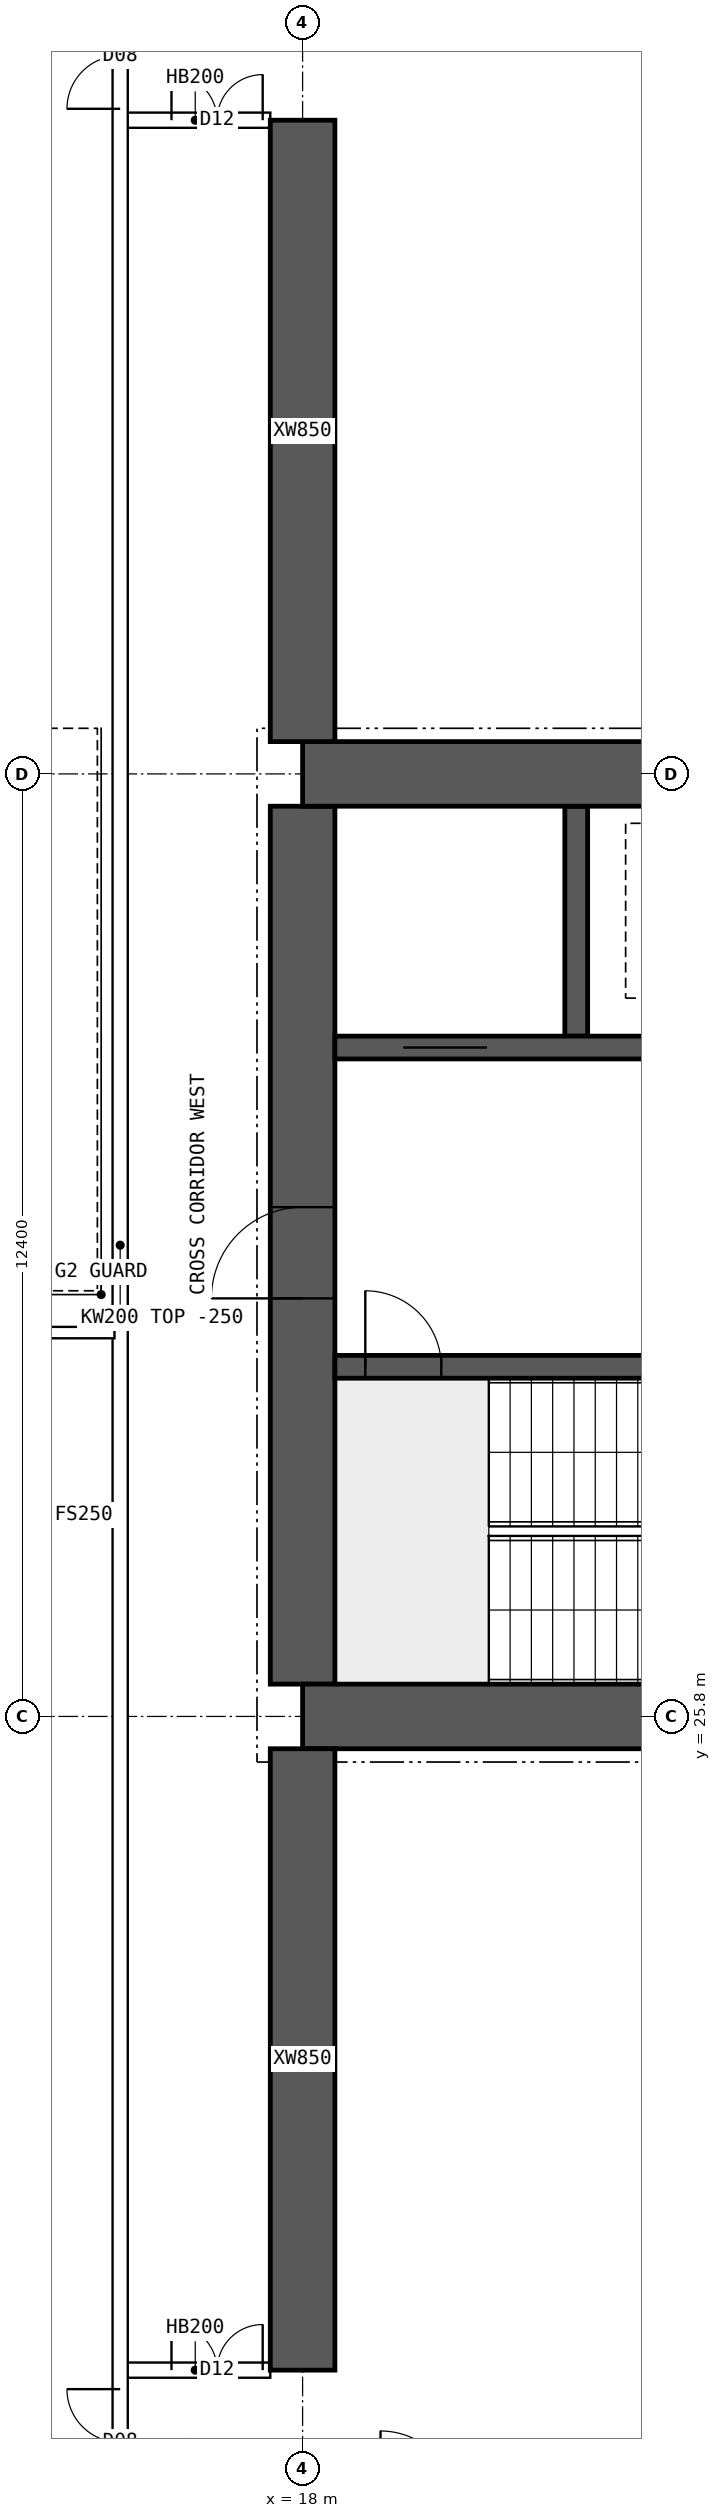
"""IFC4 building model, lengths in metres.
Left out: names, types, materials, properties, quantities, classifications, styles, units other than length and angle.
Written with IfcOpenShell. Run it as: python <this file> out.ifc"""

import sys

from ifc_helpers import new_model, si_unit, direction, frame, frame_2d, origin, place, context, subcontext, project, spatial, polyline, rectangle, outline, extrude, element, fill, save


model = new_model("IFC4")
c1 = context("Model", 3, precision=1e-05, world=origin(), true_north=direction((0.0, 1.0)))
c2 = subcontext(c1, "Body", "Model", "MODEL_VIEW")
j1 = project(units=[si_unit("LENGTHUNIT", "METRE"), si_unit("PLANEANGLEUNIT", "RADIAN")], contexts=[c1])
p1 = place(None, origin())
s1 = spatial("IfcSite", under=j1, at=p1, CompositionType="ELEMENT")
p2 = place(p1, origin())
s2 = spatial("IfcBuilding", under=s1, at=p2, CompositionType="ELEMENT")
p3 = place(p2, frame((0.0, 0.0, 182.35)))
s3 = spatial("IfcBuildingStorey", under=s2, at=p3, CompositionType="ELEMENT", Elevation=182.35)
for number, where, z_axis, x_axis in (
    (1, (18.0, 25.8, 0.0), (0.0, 0.0, 1.0), (1.0, 0.0, 0.0)),
    (2, (18.0, 38.2, 0.0), (0.0, 0.0, 1.0), (1.0, 0.0, 0.0)),
):
    element("IfcWall", number, at=place(p3, frame(where, z_axis=z_axis, x_axis=x_axis)), inside=s3, PredefinedType="SHEAR", context=c2, shape_type="SweptSolid", body=[
        extrude(rectangle(XDim=48.0, YDim=0.85, at=frame_2d((24.0, 0.0))), origin(), (0.0, 0.0, 1.0), 3.75),
    ])
p4 = place(p3, frame((18.0, 26.225, 0.0), z_axis=(0.0, 0.0, 1.0), x_axis=(0.0, 1.0, 0.0)))
e3 = element("IfcWall", 3, at=p4, inside=s3, PredefinedType="SHEAR", context=c2, shape_type="SweptSolid", body=[
    extrude(rectangle(XDim=11.55, YDim=0.85, at=frame_2d((5.775, 0.0))), origin(), (0.0, 0.0, 1.0), 3.75),
])
p5 = place(p4, frame((5.075, 0.0, 0.0)))
e4 = element("IfcOpeningElement", 4, at=p5, cuts=e3, PredefinedType="OPENING", context=c2, shape_type="SweptSolid", body=[
    extrude(rectangle(XDim=1.2, YDim=2.1, at=frame_2d((0.6, 1.05))), frame((0.0, 0.435, 0.0), z_axis=(0.0, -1.0, 0.0), x_axis=(1.0, 0.0, 0.0)), (0.0, 0.0, 1.0), 0.87),
])
p6 = place(p3, frame((18.425, 30.4, 0.0), z_axis=(0.0, 0.0, 1.0), x_axis=(1.0, 0.0, 0.0)))
e5 = element("IfcWall", 5, at=p6, inside=s3, PredefinedType="SHEAR", context=c2, shape_type="SweptSolid", body=[
    extrude(rectangle(XDim=47.15, YDim=0.3, at=frame_2d((23.575, 0.0))), origin(), (0.0, 0.0, 1.0), 3.75),
])
p7 = place(p6, frame((0.4, 0.0, 0.0)))
e6 = element("IfcOpeningElement", 6, at=p7, cuts=e5, PredefinedType="OPENING", context=c2, shape_type="SweptSolid", body=[
    extrude(rectangle(XDim=1.0, YDim=2.1, at=frame_2d((0.5, 1.05))), frame((0.0, 0.16, 0.0), z_axis=(0.0, -1.0, 0.0), x_axis=(1.0, 0.0, 0.0)), (0.0, 0.0, 1.0), 0.32),
])
p8 = place(p6, frame((45.75, 0.0, 0.0)))
e7 = element("IfcOpeningElement", 7, at=p8, cuts=e5, PredefinedType="OPENING", context=c2, shape_type="SweptSolid", body=[
    extrude(rectangle(XDim=1.0, YDim=2.1, at=frame_2d((0.5, 1.05))), frame((0.0, 0.16, 0.0), z_axis=(0.0, -1.0, 0.0), x_axis=(1.0, 0.0, 0.0)), (0.0, 0.0, 1.0), 0.32),
])
p9 = place(p6, frame((8.325, 0.0, 0.0)))
e8 = element("IfcOpeningElement", 8, at=p9, cuts=e5, PredefinedType="OPENING", context=c2, shape_type="SweptSolid", body=[
    extrude(rectangle(XDim=1.1, YDim=2.1, at=frame_2d((0.55, 1.05))), frame((0.0, 0.16, 0.0), z_axis=(0.0, -1.0, 0.0), x_axis=(1.0, 0.0, 0.0)), (0.0, 0.0, 1.0), 0.32),
])
p10 = place(p6, frame((10.925, 0.0, 0.0)))
e9 = element("IfcOpeningElement", 9, at=p10, cuts=e5, PredefinedType="OPENING", context=c2, shape_type="SweptSolid", body=[
    extrude(rectangle(XDim=1.1, YDim=2.1, at=frame_2d((0.55, 1.05))), frame((0.0, 0.16, 0.0), z_axis=(0.0, -1.0, 0.0), x_axis=(1.0, 0.0, 0.0)), (0.0, 0.0, 1.0), 0.32),
])
p11 = place(p6, frame((13.525, 0.0, 0.0)))
e10 = element("IfcOpeningElement", 10, at=p11, cuts=e5, PredefinedType="OPENING", context=c2, shape_type="SweptSolid", body=[
    extrude(rectangle(XDim=1.1, YDim=2.1, at=frame_2d((0.55, 1.05))), frame((0.0, 0.16, 0.0), z_axis=(0.0, -1.0, 0.0), x_axis=(1.0, 0.0, 0.0)), (0.0, 0.0, 1.0), 0.32),
])
p12 = place(p6, frame((16.125, 0.0, 0.0)))
e11 = element("IfcOpeningElement", 11, at=p12, cuts=e5, PredefinedType="OPENING", context=c2, shape_type="SweptSolid", body=[
    extrude(rectangle(XDim=1.1, YDim=2.1, at=frame_2d((0.55, 1.05))), frame((0.0, 0.16, 0.0), z_axis=(0.0, -1.0, 0.0), x_axis=(1.0, 0.0, 0.0)), (0.0, 0.0, 1.0), 0.32),
])
p13 = place(p6, frame((18.9, 0.0, 0.0)))
e12 = element("IfcOpeningElement", 12, at=p13, cuts=e5, PredefinedType="OPENING", context=c2, shape_type="SweptSolid", body=[
    extrude(rectangle(XDim=0.9, YDim=2.1, at=frame_2d((0.45, 1.05))), frame((0.0, 0.16, 0.0), z_axis=(0.0, -1.0, 0.0), x_axis=(1.0, 0.0, 0.0)), (0.0, 0.0, 1.0), 0.32),
])
p14 = place(p6, frame((30.192, 0.0, 0.0)))
e13 = element("IfcOpeningElement", 13, at=p14, cuts=e5, PredefinedType="OPENING", context=c2, shape_type="SweptSolid", body=[
    extrude(rectangle(XDim=1.1, YDim=2.1, at=frame_2d((0.55, 1.05))), frame((0.0, 0.16, 0.0), z_axis=(0.0, -1.0, 0.0), x_axis=(1.0, 0.0, 0.0)), (0.0, 0.0, 1.0), 0.32),
])
p15 = place(p6, frame((33.725, 0.0, 0.0)))
e14 = element("IfcOpeningElement", 14, at=p15, cuts=e5, PredefinedType="OPENING", context=c2, shape_type="SweptSolid", body=[
    extrude(rectangle(XDim=1.1, YDim=2.1, at=frame_2d((0.55, 1.05))), frame((0.0, 0.16, 0.0), z_axis=(0.0, -1.0, 0.0), x_axis=(1.0, 0.0, 0.0)), (0.0, 0.0, 1.0), 0.32),
])
p16 = place(p6, frame((37.258, 0.0, 0.0)))
e15 = element("IfcOpeningElement", 15, at=p16, cuts=e5, PredefinedType="OPENING", context=c2, shape_type="SweptSolid", body=[
    extrude(rectangle(XDim=1.1, YDim=2.1, at=frame_2d((0.55, 1.05))), frame((0.0, 0.16, 0.0), z_axis=(0.0, -1.0, 0.0), x_axis=(1.0, 0.0, 0.0)), (0.0, 0.0, 1.0), 0.32),
])
p17 = place(p3, frame((18.425, 34.6, 0.0), z_axis=(0.0, 0.0, 1.0), x_axis=(1.0, 0.0, 0.0)))
e16 = element("IfcWall", 16, at=p17, inside=s3, PredefinedType="SHEAR", context=c2, shape_type="SweptSolid", body=[
    extrude(rectangle(XDim=47.15, YDim=0.3, at=frame_2d((23.575, 0.0))), origin(), (0.0, 0.0, 1.0), 3.75),
])
p18 = place(p17, frame((0.9, 0.0, 0.0)))
e17 = element("IfcOpeningElement", 17, at=p18, cuts=e16, PredefinedType="OPENING", context=c2, shape_type="SweptSolid", body=[
    extrude(rectangle(XDim=1.1, YDim=2.1, at=frame_2d((0.55, 1.05))), frame((0.0, 0.16, 0.0), z_axis=(0.0, -1.0, 0.0), x_axis=(1.0, 0.0, 0.0)), (0.0, 0.0, 1.0), 0.32),
])
p19 = place(p17, frame((45.15, 0.0, 0.0)))
e18 = element("IfcOpeningElement", 18, at=p19, cuts=e16, PredefinedType="OPENING", context=c2, shape_type="SweptSolid", body=[
    extrude(rectangle(XDim=1.1, YDim=2.1, at=frame_2d((0.55, 1.05))), frame((0.0, 0.16, 0.0), z_axis=(0.0, -1.0, 0.0), x_axis=(1.0, 0.0, 0.0)), (0.0, 0.0, 1.0), 0.32),
])
p20 = place(p17, frame((4.175, 0.0, 0.0)))
e19 = element("IfcOpeningElement", 19, at=p20, cuts=e16, PredefinedType="OPENING", context=c2, shape_type="SweptSolid", body=[
    extrude(rectangle(XDim=0.9, YDim=2.1, at=frame_2d((0.45, 1.05))), frame((0.0, 0.16, 0.0), z_axis=(0.0, -1.0, 0.0), x_axis=(1.0, 0.0, 0.0)), (0.0, 0.0, 1.0), 0.32),
])
p21 = place(p17, frame((42.075, 0.0, 0.0)))
e20 = element("IfcOpeningElement", 20, at=p21, cuts=e16, PredefinedType="OPENING", context=c2, shape_type="SweptSolid", body=[
    extrude(rectangle(XDim=0.9, YDim=2.1, at=frame_2d((0.45, 1.05))), frame((0.0, 0.16, 0.0), z_axis=(0.0, -1.0, 0.0), x_axis=(1.0, 0.0, 0.0)), (0.0, 0.0, 1.0), 0.32),
])
p22 = place(p17, frame((8.95, 0.0, 0.0)))
e21 = element("IfcOpeningElement", 21, at=p22, cuts=e16, PredefinedType="OPENING", context=c2, shape_type="SweptSolid", body=[
    extrude(rectangle(XDim=0.9, YDim=2.1, at=frame_2d((0.45, 1.05))), frame((0.0, 0.16, 0.0), z_axis=(0.0, -1.0, 0.0), x_axis=(1.0, 0.0, 0.0)), (0.0, 0.0, 1.0), 0.32),
])
p23 = place(p17, frame((12.924, 0.0, 0.0)))
e22 = element("IfcOpeningElement", 22, at=p23, cuts=e16, PredefinedType="OPENING", context=c2, shape_type="SweptSolid", body=[
    extrude(rectangle(XDim=0.9, YDim=2.1, at=frame_2d((0.45, 1.05))), frame((0.0, 0.16, 0.0), z_axis=(0.0, -1.0, 0.0), x_axis=(1.0, 0.0, 0.0)), (0.0, 0.0, 1.0), 0.32),
])
p24 = place(p17, frame((16.571, 0.0, 0.0)))
e23 = element("IfcOpeningElement", 23, at=p24, cuts=e16, PredefinedType="OPENING", context=c2, shape_type="SweptSolid", body=[
    extrude(rectangle(XDim=0.9, YDim=2.1, at=frame_2d((0.45, 1.05))), frame((0.0, 0.16, 0.0), z_axis=(0.0, -1.0, 0.0), x_axis=(1.0, 0.0, 0.0)), (0.0, 0.0, 1.0), 0.32),
])
p25 = place(p17, frame((20.33, 0.0, 0.0)))
e24 = element("IfcOpeningElement", 24, at=p25, cuts=e16, PredefinedType="OPENING", context=c2, shape_type="SweptSolid", body=[
    extrude(rectangle(XDim=0.9, YDim=2.1, at=frame_2d((0.45, 1.05))), frame((0.0, 0.16, 0.0), z_axis=(0.0, -1.0, 0.0), x_axis=(1.0, 0.0, 0.0)), (0.0, 0.0, 1.0), 0.32),
])
p26 = place(p17, frame((24.736, 0.0, 0.0)))
e25 = element("IfcOpeningElement", 25, at=p26, cuts=e16, PredefinedType="OPENING", context=c2, shape_type="SweptSolid", body=[
    extrude(rectangle(XDim=0.9, YDim=2.1, at=frame_2d((0.45, 1.05))), frame((0.0, 0.16, 0.0), z_axis=(0.0, -1.0, 0.0), x_axis=(1.0, 0.0, 0.0)), (0.0, 0.0, 1.0), 0.32),
])
p27 = place(p17, frame((27.533, 0.0, 0.0)))
e26 = element("IfcOpeningElement", 26, at=p27, cuts=e16, PredefinedType="OPENING", context=c2, shape_type="SweptSolid", body=[
    extrude(rectangle(XDim=0.9, YDim=2.1, at=frame_2d((0.45, 1.05))), frame((0.0, 0.16, 0.0), z_axis=(0.0, -1.0, 0.0), x_axis=(1.0, 0.0, 0.0)), (0.0, 0.0, 1.0), 0.32),
])
p28 = place(p17, frame((33.654, 0.0, 0.0)))
e27 = element("IfcOpeningElement", 27, at=p28, cuts=e16, PredefinedType="OPENING", context=c2, shape_type="SweptSolid", body=[
    extrude(rectangle(XDim=0.9, YDim=2.1, at=frame_2d((0.45, 1.05))), frame((0.0, 0.16, 0.0), z_axis=(0.0, -1.0, 0.0), x_axis=(1.0, 0.0, 0.0)), (0.0, 0.0, 1.0), 0.32),
])
p29 = place(p3, frame((21.6, 34.75, 0.0), z_axis=(0.0, 0.0, 1.0), x_axis=(0.0, 1.0, 0.0)))
e28 = element("IfcWall", 28, at=p29, inside=s3, PredefinedType="SHEAR", context=c2, shape_type="SweptSolid", body=[
    extrude(rectangle(XDim=3.025, YDim=0.3, at=frame_2d((1.512, 0.0))), origin(), (0.0, 0.0, 1.0), 3.75),
])
for number, where, z_axis, x_axis in (
    (29, (18.0, 17.2, 0.0), (0.0, 0.0, 1.0), (0.0, 1.0, 0.0)),
    (30, (18.0, 38.625, 0.0), (0.0, 0.0, 1.0), (0.0, 1.0, 0.0)),
):
    element("IfcWall", number, at=place(p3, frame(where, z_axis=z_axis, x_axis=x_axis)), inside=s3, PredefinedType="SHEAR", context=c2, shape_type="SweptSolid", body=[
        extrude(rectangle(XDim=8.175, YDim=0.85, at=frame_2d((4.087, 0.0))), origin(), (0.0, 0.0, 1.0), 3.75),
    ])
p30 = place(p3, frame((15.6, 17.2, 0.0), z_axis=(0.0, 0.0, 1.0), x_axis=(1.0, 0.0, 0.0)))
e31 = element("IfcWall", 31, at=p30, inside=s3, PredefinedType="SOLIDWALL", context=c2, shape_type="SweptSolid", body=[
    extrude(rectangle(XDim=1.975, YDim=0.2, at=frame_2d((0.987, 0.0))), origin(), (0.0, 0.0, 1.0), 3.5),
])
p31 = place(p30, frame((0.675, 0.0, 0.0)))
e32 = element("IfcOpeningElement", 32, at=p31, cuts=e31, PredefinedType="OPENING", context=c2, shape_type="SweptSolid", body=[
    extrude(rectangle(XDim=1.2, YDim=2.1, at=frame_2d((0.6, 1.05))), frame((0.0, 0.11, 0.0), z_axis=(0.0, -1.0, 0.0), x_axis=(1.0, 0.0, 0.0)), (0.0, 0.0, 1.0), 0.22),
])
p32 = place(p3, frame((15.6, 46.8, 0.0), z_axis=(0.0, 0.0, 1.0), x_axis=(1.0, 0.0, 0.0)))
e33 = element("IfcWall", 33, at=p32, inside=s3, PredefinedType="SOLIDWALL", context=c2, shape_type="SweptSolid", body=[
    extrude(rectangle(XDim=1.975, YDim=0.2, at=frame_2d((0.987, 0.0))), origin(), (0.0, 0.0, 1.0), 3.5),
])
p33 = place(p32, frame((0.675, 0.0, 0.0)))
e34 = element("IfcOpeningElement", 34, at=p33, cuts=e33, PredefinedType="OPENING", context=c2, shape_type="SweptSolid", body=[
    extrude(rectangle(XDim=1.2, YDim=2.1, at=frame_2d((0.6, 1.05))), frame((0.0, 0.11, 0.0), z_axis=(0.0, -1.0, 0.0), x_axis=(1.0, 0.0, 0.0)), (0.0, 0.0, 1.0), 0.22),
])
p34 = place(p3, frame((8.705, 30.85, 0.0), z_axis=(0.0, 0.0, 1.0), x_axis=(1.0, 0.0, 0.0)))
e35 = element("IfcWall", 35, at=p34, inside=s3, PredefinedType="PARTITIONING", context=c2, shape_type="SweptSolid", body=[
    extrude(outline(polyline([(0.0, 0.0), (6.82, 0.0), (6.82, 3.5), (3.597, 3.5), (3.595, 3.05), (2.997, 3.05), (2.995, 3.5), (0.0, 3.5), (0.0, 0.0)])), frame((0.0, 0.075, 0.0), z_axis=(0.0, -1.0, 0.0), x_axis=(1.0, 0.0, 0.0)), (0.0, 0.0, 1.0), 0.15),
])
p35 = place(p3, frame((15.6, 10.446, 0.0), z_axis=(0.0, 0.0, 1.0), x_axis=(0.0, 1.0, 0.0)))
e36 = element("IfcWall", 36, at=p35, inside=s3, PredefinedType="SOLIDWALL", context=c2, shape_type="SweptSolid", body=[
    extrude(rectangle(XDim=43.107, YDim=0.2, at=frame_2d((21.554, 0.0))), origin(), (0.0, 0.0, 1.0), 3.5),
])
p36 = place(p35, frame((5.104, 0.0, 0.0)))
e37 = element("IfcOpeningElement", 37, at=p36, cuts=e36, PredefinedType="OPENING", context=c2, shape_type="SweptSolid", body=[
    extrude(rectangle(XDim=1.4, YDim=2.1, at=frame_2d((0.7, 1.05))), frame((0.0, 0.11, 0.0), z_axis=(0.0, -1.0, 0.0), x_axis=(1.0, 0.0, 0.0)), (0.0, 0.0, 1.0), 0.22),
])
p37 = place(p35, frame((36.504, 0.0, 0.0)))
e38 = element("IfcOpeningElement", 38, at=p37, cuts=e36, PredefinedType="OPENING", context=c2, shape_type="SweptSolid", body=[
    extrude(rectangle(XDim=1.4, YDim=2.1, at=frame_2d((0.7, 1.05))), frame((0.0, 0.11, 0.0), z_axis=(0.0, -1.0, 0.0), x_axis=(1.0, 0.0, 0.0)), (0.0, 0.0, 1.0), 0.22),
])
p38 = place(p5, origin())
e39 = element("IfcDoor", 39, at=p38, inside=s3, OperationType="SINGLE_SWING_LEFT", PredefinedType="DOOR", context=c2, shape_type="SweptSolid", body=[
    extrude(rectangle(XDim=1.2, YDim=2.1, at=frame_2d((0.6, 1.05))), frame((0.0, 0.025, 0.0), z_axis=(0.0, -1.0, 0.0), x_axis=(1.0, 0.0, 0.0)), (0.0, 0.0, 1.0), 0.05),
])
fill(e4, e39)
p39 = place(p7, origin())
e40 = element("IfcDoor", 40, at=p39, inside=s3, OperationType="SINGLE_SWING_LEFT", PredefinedType="DOOR", context=c2, shape_type="SweptSolid", body=[
    extrude(rectangle(XDim=1.0, YDim=2.1, at=frame_2d((0.5, 1.05))), frame((0.0, 0.025, 0.0), z_axis=(0.0, -1.0, 0.0), x_axis=(1.0, 0.0, 0.0)), (0.0, 0.0, 1.0), 0.05),
])
fill(e6, e40)
p40 = place(p18, origin())
e41 = element("IfcDoor", 41, at=p40, inside=s3, OperationType="DOUBLE_DOOR_SLIDING", PredefinedType="DOOR", context=c2, shape_type="SweptSolid", body=[
    extrude(rectangle(XDim=1.1, YDim=2.1, at=frame_2d((0.55, 1.05))), frame((0.0, 0.025, 0.0), z_axis=(0.0, -1.0, 0.0), x_axis=(1.0, 0.0, 0.0)), (0.0, 0.0, 1.0), 0.05),
])
fill(e17, e41)
p41 = place(p31, origin())
e42 = element("IfcDoor", 42, at=p41, inside=s3, OperationType="DOUBLE_DOOR_SINGLE_SWING", PredefinedType="DOOR", context=c2, shape_type="SweptSolid", body=[
    extrude(rectangle(XDim=1.2, YDim=2.1, at=frame_2d((0.6, 1.05))), frame((0.0, 0.025, 0.0), z_axis=(0.0, -1.0, 0.0), x_axis=(1.0, 0.0, 0.0)), (0.0, 0.0, 1.0), 0.05),
])
fill(e32, e42)
p42 = place(p33, origin())
e43 = element("IfcDoor", 43, at=p42, inside=s3, OperationType="DOUBLE_DOOR_SINGLE_SWING", PredefinedType="DOOR", context=c2, shape_type="SweptSolid", body=[
    extrude(rectangle(XDim=1.2, YDim=2.1, at=frame_2d((0.6, 1.05))), frame((0.0, 0.025, 0.0), z_axis=(0.0, -1.0, 0.0), x_axis=(1.0, 0.0, 0.0)), (0.0, 0.0, 1.0), 0.05),
])
fill(e34, e43)
p43 = place(p36, origin())
e44 = element("IfcDoor", 44, at=p43, inside=s3, OperationType="DOUBLE_DOOR_SINGLE_SWING", PredefinedType="DOOR", context=c2, shape_type="SweptSolid", body=[
    extrude(rectangle(XDim=1.4, YDim=2.1, at=frame_2d((0.7, 1.05))), frame((0.0, 0.025, 0.0), z_axis=(0.0, -1.0, 0.0), x_axis=(1.0, 0.0, 0.0)), (0.0, 0.0, 1.0), 0.05),
])
fill(e37, e44)
p44 = place(p37, origin())
e45 = element("IfcDoor", 45, at=p44, inside=s3, OperationType="DOUBLE_DOOR_SINGLE_SWING", PredefinedType="DOOR", context=c2, shape_type="SweptSolid", body=[
    extrude(rectangle(XDim=1.4, YDim=2.1, at=frame_2d((0.7, 1.05))), frame((0.0, 0.025, 0.0), z_axis=(0.0, -1.0, 0.0), x_axis=(1.0, 0.0, 0.0)), (0.0, 0.0, 1.0), 0.05),
])
fill(e38, e45)
save(model, sys.argv[1])
